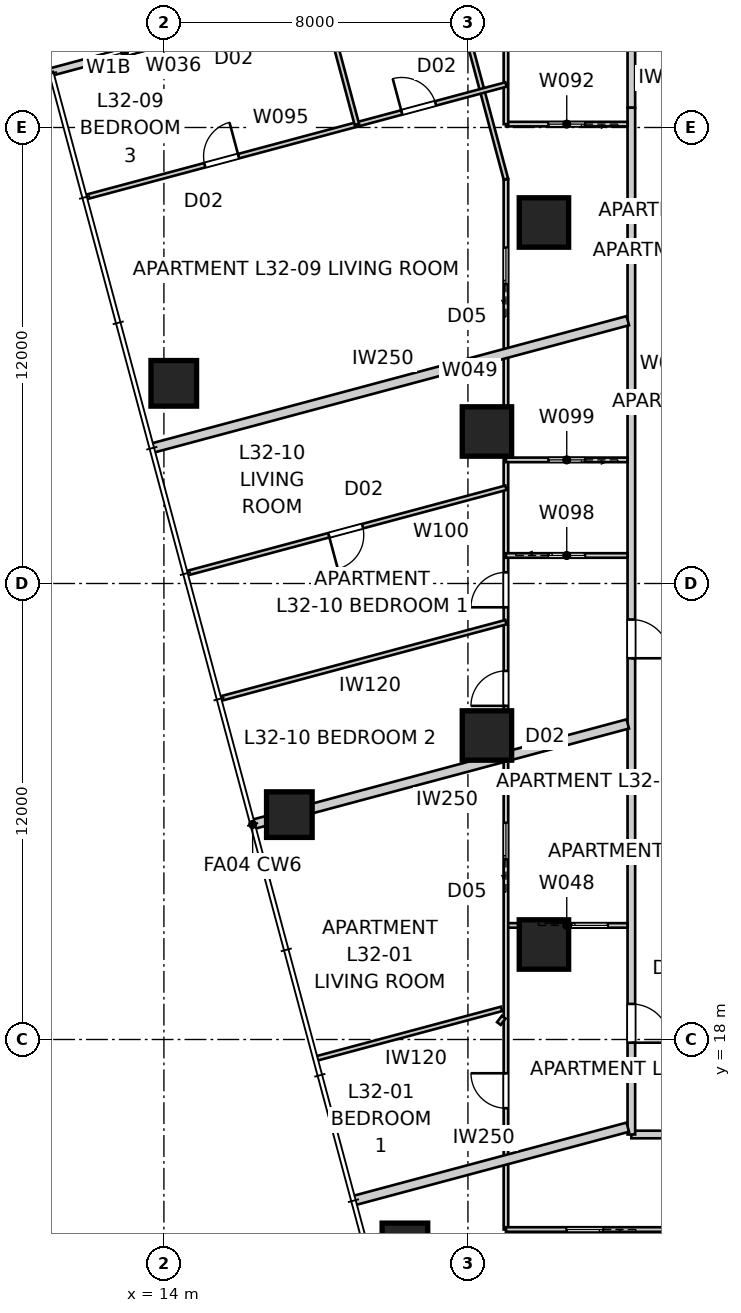
"""IFC4 building model, lengths in metres.
Left out: names, types, materials, properties, quantities, classifications, styles, units other than length and angle.
Written with IfcOpenShell. Run it as: python <this file> out.ifc"""

import sys

from ifc_helpers import new_model, si_unit, direction, frame, frame_2d, origin, origin_2d, place, context, subcontext, project, spatial, rectangle, extrude, element, fill, save


model = new_model("IFC4")
c1 = context("Model", 3, precision=1e-05, world=origin(), true_north=direction((0.0, 1.0)))
c2 = subcontext(c1, "Body", "Model", "MODEL_VIEW")
j1 = project(units=[si_unit("LENGTHUNIT", "METRE"), si_unit("PLANEANGLEUNIT", "RADIAN")], contexts=[c1])
p1 = place(None, origin())
s1 = spatial("IfcSite", under=j1, at=p1, CompositionType="ELEMENT")
p2 = place(p1, origin())
s2 = spatial("IfcBuilding", under=s1, at=p2, CompositionType="ELEMENT")
p3 = place(p2, frame((0.0, 0.0, 118.4)))
s3 = spatial("IfcBuildingStorey", under=s2, at=p3, CompositionType="ELEMENT", Elevation=118.4)
for number, where, z_axis, x_axis in (
    (1, (14.26, 35.267, 0.0), (0.0, 0.0, 1.0), (1.0, 0.0, 0.0)),
    (2, (17.301, 23.918, 0.0), (0.0, 0.0, 1.0), (1.0, 0.0, 0.0)),
    (3, (20.342, 12.568, 0.0), (0.0, 0.0, 1.0), (1.0, 0.0, 0.0)),
):
    element("IfcColumn", number, at=place(p3, frame(where, z_axis=z_axis, x_axis=x_axis)), inside=s3, PredefinedType="COLUMN", context=c2, shape_type="SweptSolid", body=[
        extrude(rectangle(XDim=1.2, YDim=1.2, at=origin_2d()), origin(), (0.0, 0.0, 1.0), 3.4),
    ])
for number, where, z_axis, x_axis in (
    (4, (24.0, 39.5, 0.0), (0.0, 0.0, 1.0), (1.0, 0.0, 0.0)),
    (5, (22.5, 34.0, 0.0), (0.0, 0.0, 1.0), (1.0, 0.0, 0.0)),
    (6, (22.5, 26.0, 0.0), (0.0, 0.0, 1.0), (1.0, 0.0, 0.0)),
    (7, (24.0, 20.5, 0.0), (0.0, 0.0, 1.0), (1.0, 0.0, 0.0)),
):
    element("IfcColumn", number, at=place(p3, frame(where, z_axis=z_axis, x_axis=x_axis)), inside=s3, PredefinedType="COLUMN", context=c2, shape_type="SweptSolid", body=[
        extrude(rectangle(XDim=1.3, YDim=1.3, at=origin_2d()), origin(), (0.0, 0.0, 1.0), 3.4),
    ])
p4 = place(p3, frame((14.893, 44.496, 0.0), z_axis=(0.0, 0.0, 1.0), x_axis=(-0.965934430412, -0.258786931944, 0.0)))
e8 = element("IfcWall", 8, at=p4, inside=s3, PredefinedType="SOLIDWALL", context=c2, shape_type="SweptSolid", body=[
    extrude(rectangle(XDim=4.0, YDim=0.2, at=frame_2d((2.0, 0.0))), origin(), (0.0, 0.0, 1.0), 3.25),
])
p5 = place(p4, frame((1.0, 0.0, 0.45)))
e9 = element("IfcOpeningElement", 9, at=p5, cuts=e8, PredefinedType="OPENING", context=c2, shape_type="SweptSolid", body=[
    extrude(rectangle(XDim=2.0, YDim=1.8, at=frame_2d((1.0, 0.9))), frame((0.0, 0.11, 0.0), z_axis=(0.0, -1.0, 0.0), x_axis=(1.0, 0.0, 0.0)), (0.0, 0.0, 1.0), 0.22),
])
p6 = place(p3, frame((26.3, 15.5, 0.0), z_axis=(0.0, 0.0, 1.0), x_axis=(1.0, 0.0, 0.0)))
e10 = element("IfcWall", 10, at=p6, inside=s3, PredefinedType="PARTITIONING", context=c2, shape_type="SweptSolid", body=[
    extrude(rectangle(XDim=28.2, YDim=0.2, at=frame_2d((14.1, 0.0))), origin(), (0.0, 0.0, 1.0), 3.25),
])
p7 = place(p6, frame((21.474, 0.0, 0.0)))
e11 = element("IfcOpeningElement", 11, at=p7, cuts=e10, PredefinedType="OPENING", context=c2, shape_type="SweptSolid", body=[
    extrude(rectangle(XDim=1.02, YDim=2.34, at=frame_2d((0.51, 1.17))), frame((0.0, 0.11, 0.0), z_axis=(0.0, -1.0, 0.0), x_axis=(1.0, 0.0, 0.0)), (0.0, 0.0, 1.0), 0.22),
])
p8 = place(p6, frame((1.353, 0.0, 0.0)))
e12 = element("IfcOpeningElement", 12, at=p8, cuts=e10, PredefinedType="OPENING", context=c2, shape_type="SweptSolid", body=[
    extrude(rectangle(XDim=1.02, YDim=2.1, at=frame_2d((0.51, 1.05))), frame((0.0, 0.11, 0.0), z_axis=(0.0, -1.0, 0.0), x_axis=(1.0, 0.0, 0.0)), (0.0, 0.0, 1.0), 0.22),
])
p9 = place(p3, frame((26.3, 44.074, 0.0), z_axis=(0.0, 0.0, 1.0), x_axis=(0.0, -1.0, 0.0)))
e13 = element("IfcWall", 13, at=p9, inside=s3, PredefinedType="PARTITIONING", context=c2, shape_type="SweptSolid", body=[
    extrude(rectangle(XDim=1.554, YDim=0.2, at=frame_2d((0.777, 0.0))), origin(), (0.0, 0.0, 1.0), 2.722),
])
p10 = place(p3, frame((26.3, 42.52, 0.0), z_axis=(0.0, 0.0, 1.0), x_axis=(0.0, -1.0, 0.0)))
e14 = element("IfcWall", 14, at=p10, inside=s3, PredefinedType="PARTITIONING", context=c2, shape_type="SweptSolid", body=[
    extrude(rectangle(XDim=27.02, YDim=0.2, at=frame_2d((13.51, 0.0))), origin(), (0.0, 0.0, 1.0), 3.25),
])
p11 = place(p10, frame((23.584, 0.0, 0.0)))
e15 = element("IfcOpeningElement", 15, at=p11, cuts=e14, PredefinedType="OPENING", context=c2, shape_type="SweptSolid", body=[
    extrude(rectangle(XDim=1.02, YDim=2.1, at=frame_2d((0.51, 1.05))), frame((0.0, 0.11, 0.0), z_axis=(0.0, -1.0, 0.0), x_axis=(1.0, 0.0, 0.0)), (0.0, 0.0, 1.0), 0.22),
])
p12 = place(p10, frame((13.468, 0.0, 0.0)))
e16 = element("IfcOpeningElement", 16, at=p12, cuts=e14, PredefinedType="OPENING", context=c2, shape_type="SweptSolid", body=[
    extrude(rectangle(XDim=1.02, YDim=2.34, at=frame_2d((0.51, 1.17))), frame((0.0, 0.11, 0.0), z_axis=(0.0, -1.0, 0.0), x_axis=(1.0, 0.0, 0.0)), (0.0, 0.0, 1.0), 0.22),
])
p13 = place(p3, frame((16.335, 23.659, 0.0), z_axis=(0.0, 0.0, 1.0), x_axis=(0.965927365002, 0.258813302479, 0.0)))
e17 = element("IfcWall", 17, at=p13, inside=s3, PredefinedType="PARTITIONING", context=c2, shape_type="SweptSolid", body=[
    extrude(rectangle(XDim=10.22, YDim=0.25, at=frame_2d((5.11, 0.0))), origin(), (0.0, 0.0, 1.0), 3.25),
])
p14 = place(p3, frame((13.682, 33.56, 0.0), z_axis=(0.0, 0.0, 1.0), x_axis=(0.965924854576, 0.258822671559, 0.0)))
e18 = element("IfcWall", 18, at=p14, inside=s3, PredefinedType="PARTITIONING", context=c2, shape_type="SweptSolid", body=[
    extrude(rectangle(XDim=12.966, YDim=0.25, at=frame_2d((6.483, 0.0))), origin(), (0.0, 0.0, 1.0), 3.25),
])
p15 = place(p3, frame((18.988, 13.758, 0.0), z_axis=(0.0, 0.0, 1.0), x_axis=(0.965929532284, 0.258805213744, 0.0)))
e19 = element("IfcWall", 19, at=p15, inside=s3, PredefinedType="PARTITIONING", context=c2, shape_type="SweptSolid", body=[
    extrude(rectangle(XDim=7.473, YDim=0.25, at=frame_2d((3.737, 0.0))), origin(), (0.0, 0.0, 1.0), 3.25),
])
p16 = place(p3, frame((23.0, 21.002, 0.0), z_axis=(0.0, 0.0, 1.0), x_axis=(1.0, 0.0, 0.0)))
e20 = element("IfcWall", 20, at=p16, inside=s3, PredefinedType="PARTITIONING", context=c2, shape_type="SweptSolid", body=[
    extrude(rectangle(XDim=3.2, YDim=0.12, at=frame_2d((1.6, 0.0))), origin(), (0.0, 0.0, 1.0), 3.25),
])
p17 = place(p16, frame((1.72, 0.0, 0.0)))
e21 = element("IfcOpeningElement", 21, at=p17, cuts=e20, PredefinedType="OPENING", context=c2, shape_type="SweptSolid", body=[
    extrude(rectangle(XDim=0.96, YDim=2.1, at=frame_2d((0.48, 1.05))), frame((0.0, 0.07, 0.0), z_axis=(0.0, -1.0, 0.0), x_axis=(1.0, 0.0, 0.0)), (0.0, 0.0, 1.0), 0.14),
])
p18 = place(p3, frame((23.0, 13.0, 0.0), z_axis=(0.0, 0.0, 1.0), x_axis=(0.0, 1.0, 0.0)))
e22 = element("IfcWall", 22, at=p18, inside=s3, PredefinedType="PARTITIONING", context=c2, shape_type="SweptSolid", body=[
    extrude(rectangle(XDim=27.64, YDim=0.12, at=frame_2d((13.82, 0.0))), origin(), (0.0, 0.0, 1.0), 2.55),
])
p19 = place(p18, frame((3.192, 0.0, 0.0)))
e23 = element("IfcOpeningElement", 23, at=p19, cuts=e22, PredefinedType="OPENING", context=c2, shape_type="SweptSolid", body=[
    extrude(rectangle(XDim=0.92, YDim=2.34, at=frame_2d((0.46, 1.17))), frame((0.0, 0.07, 0.0), z_axis=(0.0, -1.0, 0.0), x_axis=(1.0, 0.0, 0.0)), (0.0, 0.0, 1.0), 0.14),
])
p20 = place(p18, frame((13.779, 0.0, 0.0)))
e24 = element("IfcOpeningElement", 24, at=p20, cuts=e22, PredefinedType="OPENING", context=c2, shape_type="SweptSolid", body=[
    extrude(rectangle(XDim=0.92, YDim=2.34, at=frame_2d((0.46, 1.17))), frame((0.0, 0.07, 0.0), z_axis=(0.0, -1.0, 0.0), x_axis=(1.0, 0.0, 0.0)), (0.0, 0.0, 1.0), 0.14),
])
p21 = place(p18, frame((16.374, 0.0, 0.0)))
e25 = element("IfcOpeningElement", 25, at=p21, cuts=e22, PredefinedType="OPENING", context=c2, shape_type="SweptSolid", body=[
    extrude(rectangle(XDim=0.92, YDim=2.34, at=frame_2d((0.46, 1.17))), frame((0.0, 0.07, 0.0), z_axis=(0.0, -1.0, 0.0), x_axis=(1.0, 0.0, 0.0)), (0.0, 0.0, 1.0), 0.14),
])
p22 = place(p18, frame((9.743, 0.0, 0.0)))
e26 = element("IfcOpeningElement", 26, at=p22, cuts=e22, PredefinedType="OPENING", context=c2, shape_type="SweptSolid", body=[
    extrude(rectangle(XDim=0.96, YDim=2.1, at=frame_2d((0.48, 1.05))), frame((0.0, 0.07, 0.0), z_axis=(0.0, -1.0, 0.0), x_axis=(1.0, 0.0, 0.0)), (0.0, 0.0, 1.0), 0.14),
])
p23 = place(p18, frame((24.879, 0.0, 0.0)))
e27 = element("IfcOpeningElement", 27, at=p23, cuts=e22, PredefinedType="OPENING", context=c2, shape_type="SweptSolid", body=[
    extrude(rectangle(XDim=0.96, YDim=2.1, at=frame_2d((0.48, 1.05))), frame((0.0, 0.07, 0.0), z_axis=(0.0, -1.0, 0.0), x_axis=(1.0, 0.0, 0.0)), (0.0, 0.0, 1.0), 0.14),
])
p24 = place(p3, frame((22.813, 18.42, 0.0), z_axis=(0.0, 0.0, 1.0), x_axis=(0.609039064162, 0.793140226142, 0.0)))
e28 = element("IfcWall", 28, at=p24, inside=s3, PredefinedType="PARTITIONING", context=c2, shape_type="SweptSolid", body=[
    extrude(rectangle(XDim=0.211, YDim=0.12, at=frame_2d((0.105, 0.0))), origin(), (0.0, 0.0, 1.0), 3.25),
])
p25 = place(p3, frame((22.884, 18.805, 0.0), z_axis=(0.0, 0.0, 1.0), x_axis=(-0.965921615375, -0.258834759935, 0.0)))
e29 = element("IfcWall", 29, at=p25, inside=s3, PredefinedType="PARTITIONING", context=c2, shape_type="SweptSolid", body=[
    extrude(rectangle(XDim=5.029, YDim=0.12, at=frame_2d((2.515, 0.0))), origin(), (0.0, 0.0, 1.0), 2.722),
])
p26 = place(p3, frame((29.147, 13.0, 0.0), z_axis=(0.0, 0.0, 1.0), x_axis=(-1.0, 0.0, 0.0)))
e30 = element("IfcWall", 30, at=p26, inside=s3, PredefinedType="PARTITIONING", context=c2, shape_type="SweptSolid", body=[
    extrude(rectangle(XDim=6.147, YDim=0.12, at=frame_2d((3.074, 0.0))), origin(), (0.0, 0.0, 1.0), 3.25),
])
p27 = place(p26, frame((3.591, 0.0, 0.0)))
e31 = element("IfcOpeningElement", 31, at=p27, cuts=e30, PredefinedType="OPENING", context=c2, shape_type="SweptSolid", body=[
    extrude(rectangle(XDim=0.96, YDim=2.1, at=frame_2d((0.48, 1.05))), frame((0.0, 0.07, 0.0), z_axis=(0.0, -1.0, 0.0), x_axis=(1.0, 0.0, 0.0)), (0.0, 0.0, 1.0), 0.14),
])
p28 = place(p3, frame((19.911, 10.468, 0.0), z_axis=(0.0, 0.0, 1.0), x_axis=(0.965927203676, 0.25881390457, 0.0)))
e32 = element("IfcWall", 32, at=p28, inside=s3, PredefinedType="PARTITIONING", context=c2, shape_type="SweptSolid", body=[
    extrude(rectangle(XDim=9.357, YDim=0.12, at=frame_2d((4.678, 0.0))), origin(), (0.0, 0.0, 1.0), 2.638),
])
p29 = place(p28, frame((4.391, 0.0, 0.0)))
e33 = element("IfcOpeningElement", 33, at=p29, cuts=e32, PredefinedType="OPENING", context=c2, shape_type="SweptSolid", body=[
    extrude(rectangle(XDim=0.96, YDim=2.1, at=frame_2d((0.48, 1.05))), frame((0.0, 0.07, 0.0), z_axis=(0.0, -1.0, 0.0), x_axis=(1.0, 0.0, 0.0)), (0.0, 0.0, 1.0), 0.14),
])
p30 = place(p3, frame((26.2, 42.089, 0.0), z_axis=(0.0, 0.0, 1.0), x_axis=(-1.0, 0.0, 0.0)))
e34 = element("IfcWall", 34, at=p30, inside=s3, PredefinedType="PARTITIONING", context=c2, shape_type="SweptSolid", body=[
    extrude(rectangle(XDim=3.2, YDim=0.12, at=frame_2d((1.6, 0.0))), origin(), (0.0, 0.0, 1.0), 3.25),
])
p31 = place(p30, frame((1.12, 0.0, 0.0)))
e35 = element("IfcOpeningElement", 35, at=p31, cuts=e34, PredefinedType="OPENING", context=c2, shape_type="SweptSolid", body=[
    extrude(rectangle(XDim=0.96, YDim=2.1, at=frame_2d((0.48, 1.05))), frame((0.0, 0.07, 0.0), z_axis=(0.0, -1.0, 0.0), x_axis=(1.0, 0.0, 0.0)), (0.0, 0.0, 1.0), 0.14),
])
p32 = place(p3, frame((23.0, 42.089, 0.0), z_axis=(0.0, 0.0, 1.0), x_axis=(0.0, 1.0, 0.0)))
e36 = element("IfcWall", 36, at=p32, inside=s3, PredefinedType="PARTITIONING", context=c2, shape_type="SweptSolid", body=[
    extrude(rectangle(XDim=4.911, YDim=0.12, at=frame_2d((2.456, 0.0))), origin(), (0.0, 0.0, 1.0), 3.25),
])
p33 = place(p3, frame((23.0, 40.64, 0.0), z_axis=(0.0, 0.0, 1.0), x_axis=(-0.258790139317, 0.965933571108, 0.0)))
e37 = element("IfcWall", 37, at=p33, inside=s3, PredefinedType="PARTITIONING", context=c2, shape_type="SweptSolid", body=[
    extrude(rectangle(XDim=9.783, YDim=0.12, at=frame_2d((4.892, 0.0))), origin(), (0.0, 0.0, 1.0), 2.638),
])
p34 = place(p3, frame((11.952, 40.17, 0.0), z_axis=(0.0, 0.0, 1.0), x_axis=(0.965923183761, 0.258828906952, 0.0)))
e38 = element("IfcWall", 38, at=p34, inside=s3, PredefinedType="PARTITIONING", context=c2, shape_type="SweptSolid", body=[
    extrude(rectangle(XDim=11.438, YDim=0.12, at=frame_2d((5.719, 0.0))), origin(), (0.0, 0.0, 1.0), 3.25),
])
p35 = place(p34, frame((3.233, 0.0, 0.0)))
e39 = element("IfcOpeningElement", 39, at=p35, cuts=e38, PredefinedType="OPENING", context=c2, shape_type="SweptSolid", body=[
    extrude(rectangle(XDim=0.92, YDim=2.34, at=frame_2d((0.46, 1.17))), frame((0.0, 0.07, 0.0), z_axis=(0.0, -1.0, 0.0), x_axis=(1.0, 0.0, 0.0)), (0.0, 0.0, 1.0), 0.14),
])
p36 = place(p34, frame((8.6, 0.0, 0.0)))
e40 = element("IfcOpeningElement", 40, at=p36, cuts=e38, PredefinedType="OPENING", context=c2, shape_type="SweptSolid", body=[
    extrude(rectangle(XDim=0.92, YDim=2.34, at=frame_2d((0.46, 1.17))), frame((0.0, 0.07, 0.0), z_axis=(0.0, -1.0, 0.0), x_axis=(1.0, 0.0, 0.0)), (0.0, 0.0, 1.0), 0.14),
])
p37 = place(p3, frame((19.077, 42.08, 0.0), z_axis=(0.0, 0.0, 1.0), x_axis=(-0.258846923464, 0.965918355874, 0.0)))
e41 = element("IfcWall", 41, at=p37, inside=s3, PredefinedType="PARTITIONING", context=c2, shape_type="SweptSolid", body=[
    extrude(rectangle(XDim=7.377, YDim=0.12, at=frame_2d((3.688, 0.0))), origin(), (0.0, 0.0, 1.0), 3.25),
])
p38 = place(p3, frame((23.0, 30.737, 0.0), z_axis=(0.0, 0.0, 1.0), x_axis=(1.0, 0.0, 0.0)))
e42 = element("IfcWall", 42, at=p38, inside=s3, PredefinedType="PARTITIONING", context=c2, shape_type="SweptSolid", body=[
    extrude(rectangle(XDim=3.2, YDim=0.12, at=frame_2d((1.6, 0.0))), origin(), (0.0, 0.0, 1.0), 3.25),
])
p39 = place(p38, frame((1.12, 0.0, 0.0)))
e43 = element("IfcOpeningElement", 43, at=p39, cuts=e42, PredefinedType="OPENING", context=c2, shape_type="SweptSolid", body=[
    extrude(rectangle(XDim=0.96, YDim=2.1, at=frame_2d((0.48, 1.05))), frame((0.0, 0.07, 0.0), z_axis=(0.0, -1.0, 0.0), x_axis=(1.0, 0.0, 0.0)), (0.0, 0.0, 1.0), 0.14),
])
p40 = place(p3, frame((26.2, 33.253, 0.0), z_axis=(0.0, 0.0, 1.0), x_axis=(-1.0, 0.0, 0.0)))
e44 = element("IfcWall", 44, at=p40, inside=s3, PredefinedType="PARTITIONING", context=c2, shape_type="SweptSolid", body=[
    extrude(rectangle(XDim=3.2, YDim=0.12, at=frame_2d((1.6, 0.0))), origin(), (0.0, 0.0, 1.0), 3.25),
])
p41 = place(p40, frame((1.12, 0.0, 0.0)))
e45 = element("IfcOpeningElement", 45, at=p41, cuts=e44, PredefinedType="OPENING", context=c2, shape_type="SweptSolid", body=[
    extrude(rectangle(XDim=0.96, YDim=2.1, at=frame_2d((0.48, 1.05))), frame((0.0, 0.07, 0.0), z_axis=(0.0, -1.0, 0.0), x_axis=(1.0, 0.0, 0.0)), (0.0, 0.0, 1.0), 0.14),
])
p42 = place(p3, frame((23.0, 32.519, 0.0), z_axis=(0.0, 0.0, 1.0), x_axis=(-0.965925607751, -0.258819860698, 0.0)))
e46 = element("IfcWall", 46, at=p42, inside=s3, PredefinedType="PARTITIONING", context=c2, shape_type="SweptSolid", body=[
    extrude(rectangle(XDim=8.691, YDim=0.12, at=frame_2d((4.346, 0.0))), origin(), (0.0, 0.0, 1.0), 3.25),
])
p43 = place(p42, frame((3.906, 0.0, 0.0)))
e47 = element("IfcOpeningElement", 47, at=p43, cuts=e46, PredefinedType="OPENING", context=c2, shape_type="SweptSolid", body=[
    extrude(rectangle(XDim=0.92, YDim=2.34, at=frame_2d((0.46, 1.17))), frame((0.0, 0.07, 0.0), z_axis=(0.0, -1.0, 0.0), x_axis=(1.0, 0.0, 0.0)), (0.0, 0.0, 1.0), 0.14),
])
p44 = place(p3, frame((23.0, 28.982, 0.0), z_axis=(0.0, 0.0, 1.0), x_axis=(-0.965927309482, -0.258813509689, 0.0)))
e48 = element("IfcWall", 48, at=p44, inside=s3, PredefinedType="PARTITIONING", context=c2, shape_type="SweptSolid", body=[
    extrude(rectangle(XDim=7.776, YDim=0.12, at=frame_2d((3.888, 0.0))), origin(), (0.0, 0.0, 1.0), 3.25),
])
p45 = place(p5, origin())
e49 = element("IfcWindow", 49, at=p45, inside=s3, PartitioningType="SINGLE_PANEL", PredefinedType="WINDOW", context=c2, shape_type="SweptSolid", body=[
    extrude(rectangle(XDim=2.0, YDim=1.8, at=frame_2d((1.0, 0.9))), frame((0.0, 0.03, 0.0), z_axis=(0.0, -1.0, 0.0), x_axis=(1.0, 0.0, 0.0)), (0.0, 0.0, 1.0), 0.06),
])
fill(e9, e49)
p46 = place(p11, origin())
e50 = element("IfcDoor", 50, at=p46, inside=s3, OperationType="SINGLE_SWING_RIGHT", PredefinedType="DOOR", context=c2, shape_type="SweptSolid", body=[
    extrude(rectangle(XDim=1.02, YDim=2.1, at=frame_2d((0.51, 1.05))), frame((0.0, 0.025, 0.0), z_axis=(0.0, -1.0, 0.0), x_axis=(1.0, 0.0, 0.0)), (0.0, 0.0, 1.0), 0.05),
])
fill(e15, e50)
p47 = place(p12, origin())
e51 = element("IfcDoor", 51, at=p47, inside=s3, OperationType="SINGLE_SWING_RIGHT", PredefinedType="DOOR", context=c2, shape_type="SweptSolid", body=[
    extrude(rectangle(XDim=1.02, YDim=2.34, at=frame_2d((0.51, 1.17))), frame((0.0, 0.025, 0.0), z_axis=(0.0, -1.0, 0.0), x_axis=(1.0, 0.0, 0.0)), (0.0, 0.0, 1.0), 0.05),
])
fill(e16, e51)
p48 = place(p19, origin())
e52 = element("IfcDoor", 52, at=p48, inside=s3, OperationType="SINGLE_SWING_RIGHT", PredefinedType="DOOR", context=c2, shape_type="SweptSolid", body=[
    extrude(rectangle(XDim=0.92, YDim=2.34, at=frame_2d((0.46, 1.17))), frame((0.0, 0.025, 0.0), z_axis=(0.0, -1.0, 0.0), x_axis=(1.0, 0.0, 0.0)), (0.0, 0.0, 1.0), 0.05),
])
fill(e23, e52)
p49 = place(p17, origin())
e53 = element("IfcDoor", 53, at=p49, inside=s3, OperationType="SLIDING_TO_LEFT", PredefinedType="DOOR", context=c2, shape_type="SweptSolid", body=[
    extrude(rectangle(XDim=0.96, YDim=2.1, at=frame_2d((0.48, 1.05))), frame((0.0, 0.025, 0.0), z_axis=(0.0, -1.0, 0.0), x_axis=(1.0, 0.0, 0.0)), (0.0, 0.0, 1.0), 0.05),
])
fill(e21, e53)
p50 = place(p20, origin())
e54 = element("IfcDoor", 54, at=p50, inside=s3, OperationType="SINGLE_SWING_LEFT", PredefinedType="DOOR", context=c2, shape_type="SweptSolid", body=[
    extrude(rectangle(XDim=0.92, YDim=2.34, at=frame_2d((0.46, 1.17))), frame((0.0, 0.025, 0.0), z_axis=(0.0, -1.0, 0.0), x_axis=(1.0, 0.0, 0.0)), (0.0, 0.0, 1.0), 0.05),
])
fill(e24, e54)
p51 = place(p39, origin())
e55 = element("IfcDoor", 55, at=p51, inside=s3, OperationType="SLIDING_TO_LEFT", PredefinedType="DOOR", context=c2, shape_type="SweptSolid", body=[
    extrude(rectangle(XDim=0.96, YDim=2.1, at=frame_2d((0.48, 1.05))), frame((0.0, 0.025, 0.0), z_axis=(0.0, -1.0, 0.0), x_axis=(1.0, 0.0, 0.0)), (0.0, 0.0, 1.0), 0.05),
])
fill(e43, e55)
p52 = place(p21, origin())
e56 = element("IfcDoor", 56, at=p52, inside=s3, OperationType="SINGLE_SWING_LEFT", PredefinedType="DOOR", context=c2, shape_type="SweptSolid", body=[
    extrude(rectangle(XDim=0.92, YDim=2.34, at=frame_2d((0.46, 1.17))), frame((0.0, 0.025, 0.0), z_axis=(0.0, -1.0, 0.0), x_axis=(1.0, 0.0, 0.0)), (0.0, 0.0, 1.0), 0.05),
])
fill(e25, e56)
p53 = place(p27, origin())
e57 = element("IfcDoor", 57, at=p53, inside=s3, OperationType="SLIDING_TO_LEFT", PredefinedType="DOOR", context=c2, shape_type="SweptSolid", body=[
    extrude(rectangle(XDim=0.96, YDim=2.1, at=frame_2d((0.48, 1.05))), frame((0.0, 0.025, 0.0), z_axis=(0.0, -1.0, 0.0), x_axis=(1.0, 0.0, 0.0)), (0.0, 0.0, 1.0), 0.05),
])
fill(e31, e57)
p54 = place(p31, origin())
e58 = element("IfcDoor", 58, at=p54, inside=s3, OperationType="SLIDING_TO_LEFT", PredefinedType="DOOR", context=c2, shape_type="SweptSolid", body=[
    extrude(rectangle(XDim=0.96, YDim=2.1, at=frame_2d((0.48, 1.05))), frame((0.0, 0.025, 0.0), z_axis=(0.0, -1.0, 0.0), x_axis=(1.0, 0.0, 0.0)), (0.0, 0.0, 1.0), 0.05),
])
fill(e35, e58)
p55 = place(p22, origin())
e59 = element("IfcDoor", 59, at=p55, inside=s3, OperationType="SLIDING_TO_LEFT", PredefinedType="DOOR", context=c2, shape_type="SweptSolid", body=[
    extrude(rectangle(XDim=0.96, YDim=2.1, at=frame_2d((0.48, 1.05))), frame((0.0, 0.025, 0.0), z_axis=(0.0, -1.0, 0.0), x_axis=(1.0, 0.0, 0.0)), (0.0, 0.0, 1.0), 0.05),
])
fill(e26, e59)
p56 = place(p41, origin())
e60 = element("IfcDoor", 60, at=p56, inside=s3, OperationType="SLIDING_TO_LEFT", PredefinedType="DOOR", context=c2, shape_type="SweptSolid", body=[
    extrude(rectangle(XDim=0.96, YDim=2.1, at=frame_2d((0.48, 1.05))), frame((0.0, 0.025, 0.0), z_axis=(0.0, -1.0, 0.0), x_axis=(1.0, 0.0, 0.0)), (0.0, 0.0, 1.0), 0.05),
])
fill(e45, e60)
p57 = place(p23, origin())
e61 = element("IfcDoor", 61, at=p57, inside=s3, OperationType="SLIDING_TO_LEFT", PredefinedType="DOOR", context=c2, shape_type="SweptSolid", body=[
    extrude(rectangle(XDim=0.96, YDim=2.1, at=frame_2d((0.48, 1.05))), frame((0.0, 0.025, 0.0), z_axis=(0.0, -1.0, 0.0), x_axis=(1.0, 0.0, 0.0)), (0.0, 0.0, 1.0), 0.05),
])
fill(e27, e61)
p58 = place(p35, origin())
e62 = element("IfcDoor", 62, at=p58, inside=s3, OperationType="SINGLE_SWING_RIGHT", PredefinedType="DOOR", context=c2, shape_type="SweptSolid", body=[
    extrude(rectangle(XDim=0.92, YDim=2.34, at=frame_2d((0.46, 1.17))), frame((0.0, 0.025, 0.0), z_axis=(0.0, -1.0, 0.0), x_axis=(1.0, 0.0, 0.0)), (0.0, 0.0, 1.0), 0.05),
])
fill(e39, e62)
p59 = place(p36, origin())
e63 = element("IfcDoor", 63, at=p59, inside=s3, OperationType="SINGLE_SWING_LEFT", PredefinedType="DOOR", context=c2, shape_type="SweptSolid", body=[
    extrude(rectangle(XDim=0.92, YDim=2.34, at=frame_2d((0.46, 1.17))), frame((0.0, 0.025, 0.0), z_axis=(0.0, -1.0, 0.0), x_axis=(1.0, 0.0, 0.0)), (0.0, 0.0, 1.0), 0.05),
])
fill(e40, e63)
p60 = place(p43, origin())
e64 = element("IfcDoor", 64, at=p60, inside=s3, OperationType="SINGLE_SWING_RIGHT", PredefinedType="DOOR", context=c2, shape_type="SweptSolid", body=[
    extrude(rectangle(XDim=0.92, YDim=2.34, at=frame_2d((0.46, 1.17))), frame((0.0, 0.025, 0.0), z_axis=(0.0, -1.0, 0.0), x_axis=(1.0, 0.0, 0.0)), (0.0, 0.0, 1.0), 0.05),
])
fill(e47, e64)
save(model, sys.argv[1])
